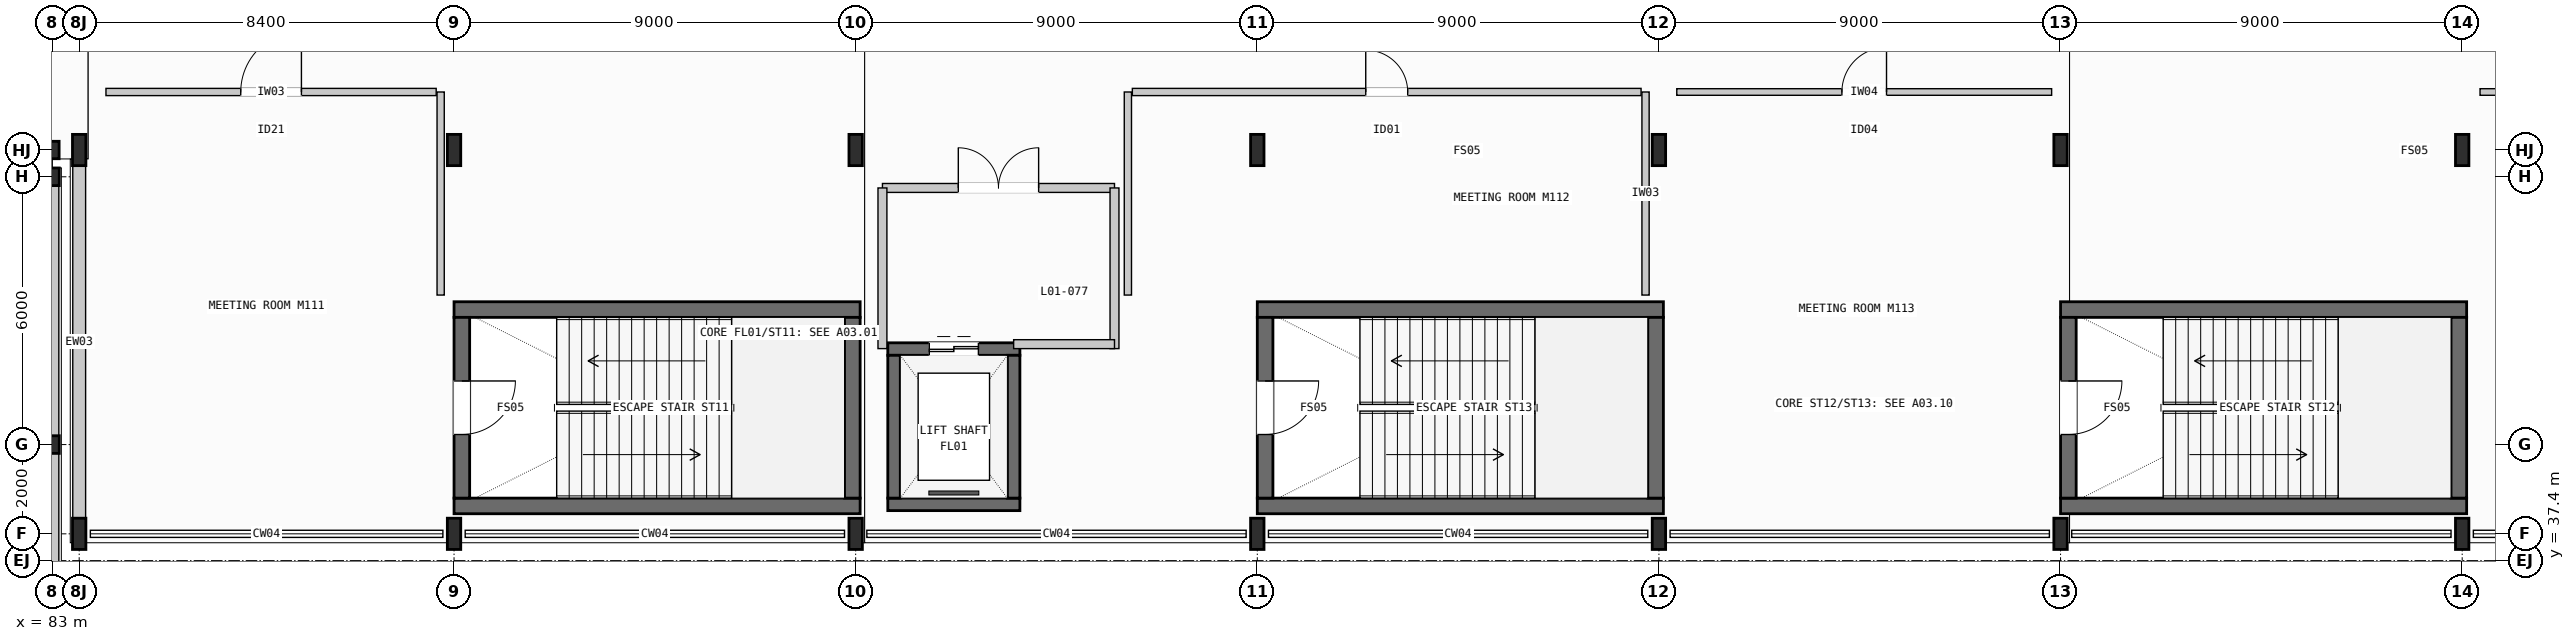
"""IFC4 building model, lengths in metres.
Left out: names, types, materials, properties, quantities, classifications, styles, units other than length and angle.
Written with IfcOpenShell. Run it as: python <this file> out.ifc"""

import sys

from ifc_helpers import new_model, si_unit, direction, frame, frame_2d, origin, origin_2d, place, context, subcontext, project, spatial, rectangle, i_section, extrude, element, fill, save


model = new_model("IFC4")
c1 = context("Model", 3, precision=1e-05, world=origin(), true_north=direction((0.0, 1.0)))
c2 = subcontext(c1, "Body", "Model", "MODEL_VIEW")
j1 = project(units=[si_unit("LENGTHUNIT", "METRE"), si_unit("PLANEANGLEUNIT", "RADIAN")], contexts=[c1])
p1 = place(None, origin())
s1 = spatial("IfcSite", under=j1, at=p1, CompositionType="ELEMENT")
p2 = place(p1, origin())
s2 = spatial("IfcBuilding", under=s1, at=p2, CompositionType="ELEMENT")
p3 = place(p2, frame((0.0, 0.0, 6.0)))
s3 = spatial("IfcBuildingStorey", under=s2, at=p3, CompositionType="ELEMENT", Elevation=6.0)
for number, where, z_axis, x_axis in (
    (1, (83.0, 40.0, 0.0), (0.0, 0.0, 1.0), (1.0, 0.0, 0.0)),
    (2, (83.0, 46.0, 0.0), (0.0, 0.0, 1.0), (1.0, 0.0, 0.0)),
):
    element("IfcColumn", number, at=place(p3, frame(where, z_axis=z_axis, x_axis=x_axis)), inside=s3, PredefinedType="COLUMN", context=c2, shape_type="SweptSolid", body=[
        extrude(i_section(OverallWidth=0.308, OverallDepth=0.395, WebThickness=0.021, FlangeThickness=0.04, FilletRadius=0.027, at=origin_2d()), origin(), (0.0, 0.0, 1.0), 5.4),
    ])
p4 = place(p3, frame((83.0, 46.6, 0.0), z_axis=(0.0, 0.0, 1.0), x_axis=(1.0, 0.0, 0.0)))
e3 = element("IfcColumn", 3, at=p4, inside=s3, PredefinedType="COLUMN", context=c2, shape_type="SweptSolid", body=[
    extrude(i_section(OverallWidth=0.3, OverallDepth=0.39, WebThickness=0.011, FlangeThickness=0.019, FilletRadius=0.027, at=origin_2d()), origin(), (0.0, 0.0, 1.0), 5.4),
])
for number, where, z_axis, x_axis in (
    (4, (83.6, 38.0, 0.0), (0.0, 0.0, 1.0), (1.0, 0.0, 0.0)),
    (5, (83.6, 46.6, 0.0), (0.0, 0.0, 1.0), (1.0, 0.0, 0.0)),
    (6, (92.0, 38.0, 0.0), (0.0, 0.0, 1.0), (1.0, 0.0, 0.0)),
    (7, (92.0, 46.6, 0.0), (0.0, 0.0, 1.0), (1.0, 0.0, 0.0)),
    (8, (101.0, 38.0, 0.0), (0.0, 0.0, 1.0), (1.0, 0.0, 0.0)),
    (9, (101.0, 46.6, 0.0), (0.0, 0.0, 1.0), (1.0, 0.0, 0.0)),
    (10, (110.0, 38.0, 0.0), (0.0, 0.0, 1.0), (1.0, 0.0, 0.0)),
    (11, (110.0, 46.6, 0.0), (0.0, 0.0, 1.0), (1.0, 0.0, 0.0)),
    (12, (119.0, 38.0, 0.0), (0.0, 0.0, 1.0), (1.0, 0.0, 0.0)),
    (13, (119.0, 46.6, 0.0), (0.0, 0.0, 1.0), (1.0, 0.0, 0.0)),
    (14, (128.0, 38.0, 0.0), (0.0, 0.0, 1.0), (1.0, 0.0, 0.0)),
    (15, (128.0, 46.6, 0.0), (0.0, 0.0, 1.0), (1.0, 0.0, 0.0)),
    (16, (137.0, 38.0, 0.0), (0.0, 0.0, 1.0), (1.0, 0.0, 0.0)),
    (17, (137.0, 46.6, 0.0), (0.0, 0.0, 1.0), (1.0, 0.0, 0.0)),
):
    element("IfcColumn", number, at=place(p3, frame(where, z_axis=z_axis, x_axis=x_axis)), inside=s3, PredefinedType="COLUMN", context=c2, shape_type="SweptSolid", body=[
        extrude(i_section(OverallWidth=0.3, OverallDepth=0.7, WebThickness=0.017, FlangeThickness=0.032, FilletRadius=0.027, at=origin_2d()), origin(), (0.0, 0.0, 1.0), 5.4),
    ])
for number, where, z_axis, x_axis in (
    (18, (92.0, 38.625, 0.0), (0.0, 0.0, 1.0), (1.0, 0.0, 0.0)),
    (19, (92.0, 43.025, 0.0), (0.0, 0.0, 1.0), (1.0, 0.0, 0.0)),
):
    element("IfcWall", number, at=place(p3, frame(where, z_axis=z_axis, x_axis=x_axis)), inside=s3, PredefinedType="SHEAR", context=c2, shape_type="SweptSolid", body=[
        extrude(rectangle(XDim=9.1, YDim=0.35, at=frame_2d((4.55, 0.0))), origin(), (0.0, 0.0, 1.0), 5.4),
    ])
p5 = place(p3, frame((92.175, 38.8, 0.0), z_axis=(0.0, 0.0, 1.0), x_axis=(0.0, 1.0, 0.0)))
e20 = element("IfcWall", 20, at=p5, inside=s3, PredefinedType="SHEAR", context=c2, shape_type="SweptSolid", body=[
    extrude(rectangle(XDim=4.05, YDim=0.35, at=frame_2d((2.025, 0.0))), origin(), (0.0, 0.0, 1.0), 5.4),
])
p6 = place(p5, frame((1.425, 0.0, 0.0)))
e21 = element("IfcOpeningElement", 21, at=p6, cuts=e20, PredefinedType="OPENING", context=c2, shape_type="SweptSolid", body=[
    extrude(rectangle(XDim=1.2, YDim=2.2, at=frame_2d((0.6, 1.1))), frame((0.0, 0.185, 0.0), z_axis=(0.0, -1.0, 0.0), x_axis=(1.0, 0.0, 0.0)), (0.0, 0.0, 1.0), 0.37),
])
p7 = place(p3, frame((100.925, 38.8, 0.0), z_axis=(0.0, 0.0, 1.0), x_axis=(0.0, 1.0, 0.0)))
e22 = element("IfcWall", 22, at=p7, inside=s3, PredefinedType="SHEAR", context=c2, shape_type="SweptSolid", body=[
    extrude(rectangle(XDim=4.05, YDim=0.35, at=frame_2d((2.025, 0.0))), origin(), (0.0, 0.0, 1.0), 5.4),
])
for number, where, z_axis, x_axis in (
    (23, (128.0, 38.625, 0.0), (0.0, 0.0, 1.0), (1.0, 0.0, 0.0)),
    (24, (128.0, 43.025, 0.0), (0.0, 0.0, 1.0), (1.0, 0.0, 0.0)),
):
    element("IfcWall", number, at=place(p3, frame(where, z_axis=z_axis, x_axis=x_axis)), inside=s3, PredefinedType="SHEAR", context=c2, shape_type="SweptSolid", body=[
        extrude(rectangle(XDim=9.1, YDim=0.35, at=frame_2d((4.55, 0.0))), origin(), (0.0, 0.0, 1.0), 5.4),
    ])
p8 = place(p3, frame((128.175, 38.8, 0.0), z_axis=(0.0, 0.0, 1.0), x_axis=(0.0, 1.0, 0.0)))
e25 = element("IfcWall", 25, at=p8, inside=s3, PredefinedType="SHEAR", context=c2, shape_type="SweptSolid", body=[
    extrude(rectangle(XDim=4.05, YDim=0.35, at=frame_2d((2.025, 0.0))), origin(), (0.0, 0.0, 1.0), 5.4),
])
p9 = place(p8, frame((1.425, 0.0, 0.0)))
e26 = element("IfcOpeningElement", 26, at=p9, cuts=e25, PredefinedType="OPENING", context=c2, shape_type="SweptSolid", body=[
    extrude(rectangle(XDim=1.2, YDim=2.2, at=frame_2d((0.6, 1.1))), frame((0.0, 0.185, 0.0), z_axis=(0.0, -1.0, 0.0), x_axis=(1.0, 0.0, 0.0)), (0.0, 0.0, 1.0), 0.37),
])
p10 = place(p3, frame((136.925, 38.8, 0.0), z_axis=(0.0, 0.0, 1.0), x_axis=(0.0, 1.0, 0.0)))
e27 = element("IfcWall", 27, at=p10, inside=s3, PredefinedType="SHEAR", context=c2, shape_type="SweptSolid", body=[
    extrude(rectangle(XDim=4.05, YDim=0.35, at=frame_2d((2.025, 0.0))), origin(), (0.0, 0.0, 1.0), 5.4),
])
for number, where, z_axis, x_axis in (
    (28, (110.0, 38.625, 0.0), (0.0, 0.0, 1.0), (1.0, 0.0, 0.0)),
    (29, (110.0, 43.025, 0.0), (0.0, 0.0, 1.0), (1.0, 0.0, 0.0)),
):
    element("IfcWall", number, at=place(p3, frame(where, z_axis=z_axis, x_axis=x_axis)), inside=s3, PredefinedType="SHEAR", context=c2, shape_type="SweptSolid", body=[
        extrude(rectangle(XDim=9.1, YDim=0.35, at=frame_2d((4.55, 0.0))), origin(), (0.0, 0.0, 1.0), 5.4),
    ])
p11 = place(p3, frame((110.175, 38.8, 0.0), z_axis=(0.0, 0.0, 1.0), x_axis=(0.0, 1.0, 0.0)))
e30 = element("IfcWall", 30, at=p11, inside=s3, PredefinedType="SHEAR", context=c2, shape_type="SweptSolid", body=[
    extrude(rectangle(XDim=4.05, YDim=0.35, at=frame_2d((2.025, 0.0))), origin(), (0.0, 0.0, 1.0), 5.4),
])
p12 = place(p11, frame((1.425, 0.0, 0.0)))
e31 = element("IfcOpeningElement", 31, at=p12, cuts=e30, PredefinedType="OPENING", context=c2, shape_type="SweptSolid", body=[
    extrude(rectangle(XDim=1.2, YDim=2.2, at=frame_2d((0.6, 1.1))), frame((0.0, 0.185, 0.0), z_axis=(0.0, -1.0, 0.0), x_axis=(1.0, 0.0, 0.0)), (0.0, 0.0, 1.0), 0.37),
])
p13 = place(p3, frame((118.925, 38.8, 0.0), z_axis=(0.0, 0.0, 1.0), x_axis=(0.0, 1.0, 0.0)))
e32 = element("IfcWall", 32, at=p13, inside=s3, PredefinedType="SHEAR", context=c2, shape_type="SweptSolid", body=[
    extrude(rectangle(XDim=4.05, YDim=0.35, at=frame_2d((2.025, 0.0))), origin(), (0.0, 0.0, 1.0), 5.4),
])
p14 = place(p3, frame((101.72, 38.66, 0.0), z_axis=(0.0, 0.0, 1.0), x_axis=(1.0, 0.0, 0.0)))
e33 = element("IfcWall", 33, at=p14, inside=s3, PredefinedType="SHEAR", context=c2, shape_type="SweptSolid", body=[
    extrude(rectangle(XDim=2.96, YDim=0.28, at=frame_2d((1.48, 0.0))), origin(), (0.0, 0.0, 1.0), 5.4),
])
p15 = place(p3, frame((101.72, 42.14, 0.0), z_axis=(0.0, 0.0, 1.0), x_axis=(1.0, 0.0, 0.0)))
e34 = element("IfcWall", 34, at=p15, inside=s3, PredefinedType="SHEAR", context=c2, shape_type="SweptSolid", body=[
    extrude(rectangle(XDim=2.96, YDim=0.28, at=frame_2d((1.48, 0.0))), origin(), (0.0, 0.0, 1.0), 5.4),
])
p16 = place(p15, frame((0.93, 0.0, 0.0)))
e35 = element("IfcOpeningElement", 35, at=p16, cuts=e34, PredefinedType="OPENING", context=c2, shape_type="SweptSolid", body=[
    extrude(rectangle(XDim=1.1, YDim=2.15, at=frame_2d((0.55, 1.075))), frame((0.0, 0.15, 0.0), z_axis=(0.0, -1.0, 0.0), x_axis=(1.0, 0.0, 0.0)), (0.0, 0.0, 1.0), 0.3),
])
for number, where, z_axis, x_axis in (
    (36, (101.86, 38.8, 0.0), (0.0, 0.0, 1.0), (0.0, 1.0, 0.0)),
    (37, (104.54, 38.8, 0.0), (0.0, 0.0, 1.0), (0.0, 1.0, 0.0)),
):
    element("IfcWall", number, at=place(p3, frame(where, z_axis=z_axis, x_axis=x_axis)), inside=s3, PredefinedType="SHEAR", context=c2, shape_type="SweptSolid", body=[
        extrude(rectangle(XDim=3.2, YDim=0.28, at=frame_2d((1.6, 0.0))), origin(), (0.0, 0.0, 1.0), 5.4),
    ])
for number, where, z_axis, x_axis in (
    (38, (83.0, 34.194, 0.0), (0.0, 0.0, 1.0), (0.0, 1.0, 0.0)),
    (39, (83.0, 40.194, 0.0), (0.0, 0.0, 1.0), (0.0, 1.0, 0.0)),
):
    element("IfcWall", number, at=place(p3, frame(where, z_axis=z_axis, x_axis=x_axis)), inside=s3, PredefinedType="STANDARD", context=c2, shape_type="SweptSolid", body=[
        extrude(rectangle(XDim=5.613, YDim=0.288, at=frame_2d((2.806, 0.0))), origin(), (0.0, 0.0, 1.0), 2.2),
    ])
p17 = place(p3, frame((83.6, 38.346, 0.0), z_axis=(0.0, 0.0, 1.0), x_axis=(0.0, 1.0, 0.0)))
e40 = element("IfcWall", 40, at=p17, inside=s3, PredefinedType="STANDARD", context=c2, shape_type="SweptSolid", body=[
    extrude(rectangle(XDim=7.908, YDim=0.288, at=frame_2d((3.954, 0.0))), origin(), (0.0, 0.0, 1.0), 4.6),
])
p18 = place(p3, frame((101.6, 45.75, 0.0), z_axis=(0.0, 0.0, 1.0), x_axis=(1.0, 0.0, 0.0)))
e41 = element("IfcWall", 41, at=p18, inside=s3, PredefinedType="PARTITIONING", context=c2, shape_type="SweptSolid", body=[
    extrude(rectangle(XDim=5.2, YDim=0.2, at=frame_2d((2.6, 0.0))), origin(), (0.0, 0.0, 1.0), 4.0),
])
p19 = place(p18, frame((1.7, 0.0, 0.0)))
e42 = element("IfcOpeningElement", 42, at=p19, cuts=e41, PredefinedType="OPENING", context=c2, shape_type="SweptSolid", body=[
    extrude(rectangle(XDim=1.8, YDim=2.2, at=frame_2d((0.9, 1.1))), frame((0.0, 0.11, 0.0), z_axis=(0.0, -1.0, 0.0), x_axis=(1.0, 0.0, 0.0)), (0.0, 0.0, 1.0), 0.22),
])
for number, where, z_axis, x_axis in (
    (43, (101.6, 42.15, 0.0), (0.0, 0.0, 1.0), (0.0, 1.0, 0.0)),
    (44, (106.8, 42.15, 0.0), (0.0, 0.0, 1.0), (0.0, 1.0, 0.0)),
):
    element("IfcWall", number, at=place(p3, frame(where, z_axis=z_axis, x_axis=x_axis)), inside=s3, PredefinedType="PARTITIONING", context=c2, shape_type="SweptSolid", body=[
        extrude(rectangle(XDim=3.6, YDim=0.2, at=frame_2d((1.8, 0.0))), origin(), (0.0, 0.0, 1.0), 4.0),
    ])
p20 = place(p3, frame((104.54, 42.25, 0.0), z_axis=(0.0, 0.0, 1.0), x_axis=(1.0, 0.0, 0.0)))
e45 = element("IfcWall", 45, at=p20, inside=s3, PredefinedType="PARTITIONING", context=c2, shape_type="SweptSolid", body=[
    extrude(rectangle(XDim=2.26, YDim=0.2, at=frame_2d((1.13, 0.0))), origin(), (0.0, 0.0, 1.0), 4.0),
])
p21 = place(p3, frame((84.2, 47.9, 0.0), z_axis=(0.0, 0.0, 1.0), x_axis=(1.0, 0.0, 0.0)))
e46 = element("IfcWall", 46, at=p21, inside=s3, PredefinedType="PARTITIONING", context=c2, shape_type="SweptSolid", body=[
    extrude(rectangle(XDim=7.4, YDim=0.162, at=frame_2d((3.7, 0.0))), origin(), (0.0, 0.0, 1.0), 4.4),
])
p22 = place(p21, frame((3.02, 0.0, 0.0)))
e47 = element("IfcOpeningElement", 47, at=p22, cuts=e46, PredefinedType="OPENING", context=c2, shape_type="SweptSolid", body=[
    extrude(rectangle(XDim=1.36, YDim=2.3, at=frame_2d((0.68, 1.15))), frame((0.0, 0.091, 0.0), z_axis=(0.0, -1.0, 0.0), x_axis=(1.0, 0.0, 0.0)), (0.0, 0.0, 1.0), 0.182),
])
p23 = place(p3, frame((91.7, 43.35, 0.0), z_axis=(0.0, 0.0, 1.0), x_axis=(0.0, 1.0, 0.0)))
e48 = element("IfcWall", 48, at=p23, inside=s3, PredefinedType="PARTITIONING", context=c2, shape_type="SweptSolid", body=[
    extrude(rectangle(XDim=4.55, YDim=0.162, at=frame_2d((2.275, 0.0))), origin(), (0.0, 0.0, 1.0), 4.4),
])
p24 = place(p3, frame((107.2, 47.9, 0.0), z_axis=(0.0, 0.0, 1.0), x_axis=(1.0, 0.0, 0.0)))
e49 = element("IfcWall", 49, at=p24, inside=s3, PredefinedType="PARTITIONING", context=c2, shape_type="SweptSolid", body=[
    extrude(rectangle(XDim=11.4, YDim=0.162, at=frame_2d((5.7, 0.0))), origin(), (0.0, 0.0, 1.0), 4.4),
])
p25 = place(p24, frame((5.23, 0.0, 0.0)))
e50 = element("IfcOpeningElement", 50, at=p25, cuts=e49, PredefinedType="OPENING", context=c2, shape_type="SweptSolid", body=[
    extrude(rectangle(XDim=0.94, YDim=2.12, at=frame_2d((0.47, 1.06))), frame((0.0, 0.091, 0.0), z_axis=(0.0, -1.0, 0.0), x_axis=(1.0, 0.0, 0.0)), (0.0, 0.0, 1.0), 0.182),
])
for number, where, z_axis, x_axis in (
    (51, (107.1, 43.35, 0.0), (0.0, 0.0, 1.0), (0.0, 1.0, 0.0)),
    (52, (118.7, 43.35, 0.0), (0.0, 0.0, 1.0), (0.0, 1.0, 0.0)),
):
    element("IfcWall", number, at=place(p3, frame(where, z_axis=z_axis, x_axis=x_axis)), inside=s3, PredefinedType="PARTITIONING", context=c2, shape_type="SweptSolid", body=[
        extrude(rectangle(XDim=4.55, YDim=0.162, at=frame_2d((2.275, 0.0))), origin(), (0.0, 0.0, 1.0), 4.4),
    ])
p26 = place(p3, frame((119.4, 47.9, 0.0), z_axis=(0.0, 0.0, 1.0), x_axis=(1.0, 0.0, 0.0)))
e53 = element("IfcWall", 53, at=p26, inside=s3, PredefinedType="PARTITIONING", context=c2, shape_type="SweptSolid", body=[
    extrude(rectangle(XDim=8.4, YDim=0.148, at=frame_2d((4.2, 0.0))), origin(), (0.0, 0.0, 1.0), 4.4),
])
p27 = place(p26, frame((3.7, 0.0, 0.0)))
e54 = element("IfcOpeningElement", 54, at=p27, cuts=e53, PredefinedType="OPENING", context=c2, shape_type="SweptSolid", body=[
    extrude(rectangle(XDim=1.0, YDim=2.15, at=frame_2d((0.5, 1.075))), frame((0.0, 0.084, 0.0), z_axis=(0.0, -1.0, 0.0), x_axis=(1.0, 0.0, 0.0)), (0.0, 0.0, 1.0), 0.168),
])
p28 = place(p3, frame((137.4, 47.9, 0.0), z_axis=(0.0, 0.0, 1.0), x_axis=(1.0, 0.0, 0.0)))
e55 = element("IfcWall", 55, at=p28, inside=s3, PredefinedType="PARTITIONING", context=c2, shape_type="SweptSolid", body=[
    extrude(rectangle(XDim=8.0, YDim=0.148, at=frame_2d((4.0, 0.0))), origin(), (0.0, 0.0, 1.0), 4.4),
])
p29 = place(p28, frame((3.47, 0.0, 0.0)))
e56 = element("IfcOpeningElement", 56, at=p29, cuts=e55, PredefinedType="OPENING", context=c2, shape_type="SweptSolid", body=[
    extrude(rectangle(XDim=1.06, YDim=2.18, at=frame_2d((0.53, 1.09))), frame((0.0, 0.084, 0.0), z_axis=(0.0, -1.0, 0.0), x_axis=(1.0, 0.0, 0.0)), (0.0, 0.0, 1.0), 0.168),
])
p30 = place(p6, frame((1.2, 0.0, 0.0), z_axis=(0.0, 0.0, 1.0), x_axis=(-1.0, 0.0, 0.0)))
e57 = element("IfcDoor", 57, at=p30, inside=s3, OperationType="SINGLE_SWING_LEFT", PredefinedType="DOOR", context=c2, shape_type="SweptSolid", body=[
    extrude(rectangle(XDim=1.2, YDim=2.2, at=frame_2d((0.6, 1.1))), frame((0.0, 0.025, 0.0), z_axis=(0.0, -1.0, 0.0), x_axis=(1.0, 0.0, 0.0)), (0.0, 0.0, 1.0), 0.05),
])
fill(e21, e57)
p31 = place(p9, frame((1.2, 0.0, 0.0), z_axis=(0.0, 0.0, 1.0), x_axis=(-1.0, 0.0, 0.0)))
e58 = element("IfcDoor", 58, at=p31, inside=s3, OperationType="SINGLE_SWING_LEFT", PredefinedType="DOOR", context=c2, shape_type="SweptSolid", body=[
    extrude(rectangle(XDim=1.2, YDim=2.2, at=frame_2d((0.6, 1.1))), frame((0.0, 0.025, 0.0), z_axis=(0.0, -1.0, 0.0), x_axis=(1.0, 0.0, 0.0)), (0.0, 0.0, 1.0), 0.05),
])
fill(e26, e58)
p32 = place(p12, frame((1.2, 0.0, 0.0), z_axis=(0.0, 0.0, 1.0), x_axis=(-1.0, 0.0, 0.0)))
e59 = element("IfcDoor", 59, at=p32, inside=s3, OperationType="SINGLE_SWING_LEFT", PredefinedType="DOOR", context=c2, shape_type="SweptSolid", body=[
    extrude(rectangle(XDim=1.2, YDim=2.2, at=frame_2d((0.6, 1.1))), frame((0.0, 0.025, 0.0), z_axis=(0.0, -1.0, 0.0), x_axis=(1.0, 0.0, 0.0)), (0.0, 0.0, 1.0), 0.05),
])
fill(e31, e59)
p33 = place(p16, origin())
e60 = element("IfcDoor", 60, at=p33, inside=s3, OperationType="DOUBLE_DOOR_SLIDING", PredefinedType="DOOR", context=c2, shape_type="SweptSolid", body=[
    extrude(rectangle(XDim=1.1, YDim=2.15, at=frame_2d((0.55, 1.075))), frame((0.0, 0.025, 0.0), z_axis=(0.0, -1.0, 0.0), x_axis=(1.0, 0.0, 0.0)), (0.0, 0.0, 1.0), 0.05),
])
fill(e35, e60)
p34 = place(p19, origin())
e61 = element("IfcDoor", 61, at=p34, inside=s3, OperationType="DOUBLE_DOOR_SINGLE_SWING", PredefinedType="DOOR", context=c2, shape_type="SweptSolid", body=[
    extrude(rectangle(XDim=1.8, YDim=2.2, at=frame_2d((0.9, 1.1))), frame((0.0, 0.025, 0.0), z_axis=(0.0, -1.0, 0.0), x_axis=(1.0, 0.0, 0.0)), (0.0, 0.0, 1.0), 0.05),
])
fill(e42, e61)
p35 = place(p22, origin())
e62 = element("IfcDoor", 62, at=p35, inside=s3, OperationType="SINGLE_SWING_RIGHT", PredefinedType="DOOR", context=c2, shape_type="SweptSolid", body=[
    extrude(rectangle(XDim=1.36, YDim=2.3, at=frame_2d((0.68, 1.15))), frame((0.0, 0.025, 0.0), z_axis=(0.0, -1.0, 0.0), x_axis=(1.0, 0.0, 0.0)), (0.0, 0.0, 1.0), 0.05),
])
fill(e47, e62)
p36 = place(p25, origin())
e63 = element("IfcDoor", 63, at=p36, inside=s3, OperationType="SINGLE_SWING_LEFT", PredefinedType="DOOR", context=c2, shape_type="SweptSolid", body=[
    extrude(rectangle(XDim=0.94, YDim=2.12, at=frame_2d((0.47, 1.06))), frame((0.0, 0.025, 0.0), z_axis=(0.0, -1.0, 0.0), x_axis=(1.0, 0.0, 0.0)), (0.0, 0.0, 1.0), 0.05),
])
fill(e50, e63)
p37 = place(p27, origin())
e64 = element("IfcDoor", 64, at=p37, inside=s3, OperationType="SINGLE_SWING_RIGHT", PredefinedType="DOOR", context=c2, shape_type="SweptSolid", body=[
    extrude(rectangle(XDim=1.0, YDim=2.15, at=frame_2d((0.5, 1.075))), frame((0.0, 0.025, 0.0), z_axis=(0.0, -1.0, 0.0), x_axis=(1.0, 0.0, 0.0)), (0.0, 0.0, 1.0), 0.05),
])
fill(e54, e64)
save(model, sys.argv[1])
